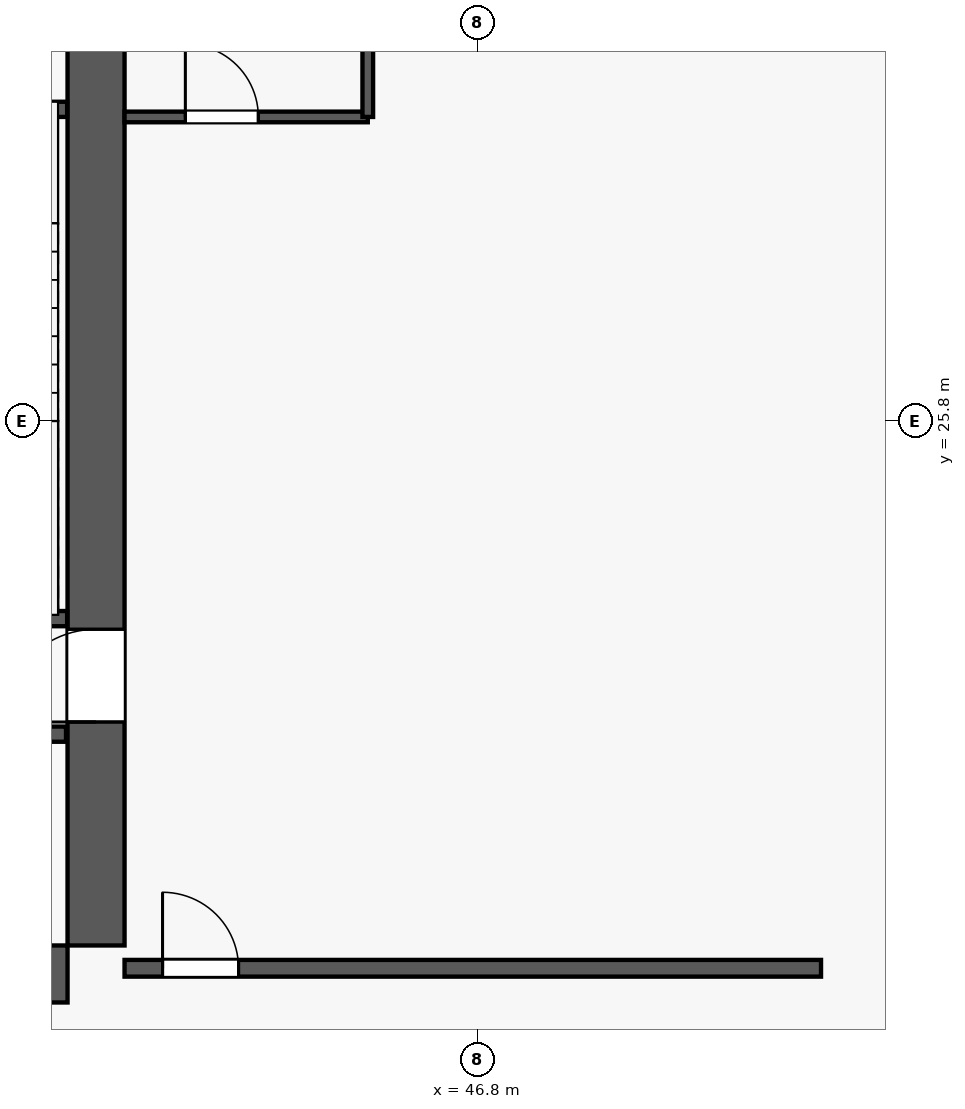
"""IFC4 building model, lengths in metres.
Left out: names, types, materials, properties, quantities, classifications, styles, units other than length and angle.
Written with IfcOpenShell. Run it as: python <this file> out.ifc"""

import sys

from ifc_helpers import new_model, si_unit, direction, frame, frame_2d, origin, origin_2d, place, context, subcontext, project, spatial, rectangle, extrude, element, fill, save


model = new_model("IFC4")
c1 = context("Model", 3, precision=1e-05, world=origin(), true_north=direction((0.0, 1.0)))
c2 = subcontext(c1, "Body", "Model", "MODEL_VIEW")
j1 = project(units=[si_unit("LENGTHUNIT", "METRE"), si_unit("PLANEANGLEUNIT", "RADIAN")], contexts=[c1])
p1 = place(None, origin())
s1 = spatial("IfcSite", under=j1, at=p1, CompositionType="ELEMENT")
p2 = place(p1, origin())
s2 = spatial("IfcBuilding", under=s1, at=p2, CompositionType="ELEMENT")
p3 = place(p2, frame((0.0, 0.0, 148.1)))
s3 = spatial("IfcBuildingStorey", under=s2, at=p3, CompositionType="ELEMENT", Elevation=148.1)
p4 = place(p3, frame((41.775, 18.525, 0.0), z_axis=(0.0, 0.0, 1.0), x_axis=(1.0, 0.0, 0.0)))
e1 = element("IfcColumn", 1, at=p4, inside=s3, PredefinedType="COLUMN", context=c2, shape_type="SweptSolid", body=[
    extrude(rectangle(XDim=0.75, YDim=0.75, at=origin_2d()), origin(), (0.0, 0.0, 1.0), 5.4),
])
p5 = place(p3, frame((23.4, 18.525, 0.0), z_axis=(0.0, 0.0, 1.0), x_axis=(1.0, 0.0, 0.0)))
e2 = element("IfcWall", 2, at=p5, inside=s3, PredefinedType="SHEAR", context=c2, shape_type="SweptSolid", body=[
    extrude(rectangle(XDim=18.0, YDim=0.75, at=frame_2d((9.0, 0.0))), origin(), (0.0, 0.0, 1.0), 5.19),
])
p6 = place(p3, frame((41.775, 18.9, 0.0), z_axis=(0.0, 0.0, 1.0), x_axis=(0.0, 1.0, 0.0)))
e3 = element("IfcWall", 3, at=p6, inside=s3, PredefinedType="SHEAR", context=c2, shape_type="SweptSolid", body=[
    extrude(rectangle(XDim=14.0, YDim=0.75, at=frame_2d((7.0, 0.0))), origin(), (0.0, 0.0, 1.0), 5.19),
])
p7 = place(p6, frame((2.94, 0.0, 0.0)))
e4 = element("IfcOpeningElement", 4, at=p7, cuts=e3, PredefinedType="OPENING", context=c2, shape_type="SweptSolid", body=[
    extrude(rectangle(XDim=1.22, YDim=2.25, at=frame_2d((0.61, 1.125))), frame((0.0, 0.385, 0.0), z_axis=(0.0, -1.0, 0.0), x_axis=(1.0, 0.0, 0.0)), (0.0, 0.0, 1.0), 0.77),
])
p8 = place(p3, frame((38.125, 23.2, 0.0), z_axis=(0.0, 0.0, 1.0), x_axis=(1.0, 0.0, 0.0)))
e5 = element("IfcWall", 5, at=p8, inside=s3, PredefinedType="PLUMBINGWALL", context=c2, shape_type="SweptSolid", body=[
    extrude(rectangle(XDim=3.27, YDim=0.2, at=frame_2d((1.635, 0.0))), origin(), (0.0, 0.0, 1.0), 5.19),
])
p9 = place(p3, frame((38.125, 29.9, 0.0), z_axis=(0.0, 0.0, 1.0), x_axis=(1.0, 0.0, 0.0)))
e6 = element("IfcWall", 6, at=p9, inside=s3, PredefinedType="PLUMBINGWALL", context=c2, shape_type="SweptSolid", body=[
    extrude(rectangle(XDim=3.27, YDim=0.2, at=frame_2d((1.635, 0.0))), origin(), (0.0, 0.0, 1.0), 5.19),
])
p10 = place(p9, frame((0.5, 0.0, 0.0)))
e7 = element("IfcOpeningElement", 7, at=p10, cuts=e6, PredefinedType="OPENING", context=c2, shape_type="SweptSolid", body=[
    extrude(rectangle(XDim=0.85, YDim=2.05, at=frame_2d((0.425, 1.025))), frame((0.0, 0.11, 0.0), z_axis=(0.0, -1.0, 0.0), x_axis=(1.0, 0.0, 0.0)), (0.0, 0.0, 1.0), 0.22),
])
p11 = place(p3, frame((23.42, 21.68, 0.0), z_axis=(0.0, 0.0, 1.0), x_axis=(1.0, 0.0, 0.0)))
e8 = element("IfcWall", 8, at=p11, inside=s3, PredefinedType="PLUMBINGWALL", context=c2, shape_type="SweptSolid", body=[
    extrude(rectangle(XDim=17.96, YDim=0.2, at=frame_2d((8.98, 0.0))), origin(), (0.0, 0.0, 1.0), 5.19),
])
p12 = place(p11, frame((11.6, 0.0, 0.0)))
e9 = element("IfcOpeningElement", 9, at=p12, cuts=e8, PredefinedType="OPENING", context=c2, shape_type="SweptSolid", body=[
    extrude(rectangle(XDim=1.1, YDim=2.2, at=frame_2d((0.55, 1.1))), frame((0.0, 0.11, 0.0), z_axis=(0.0, -1.0, 0.0), x_axis=(1.0, 0.0, 0.0)), (0.0, 0.0, 1.0), 0.22),
])
p13 = place(p11, frame((0.41, 0.0, 0.0)))
e10 = element("IfcOpeningElement", 10, at=p13, cuts=e8, PredefinedType="OPENING", context=c2, shape_type="SweptSolid", body=[
    extrude(rectangle(XDim=0.85, YDim=2.05, at=frame_2d((0.425, 1.025))), frame((0.0, 0.11, 0.0), z_axis=(0.0, -1.0, 0.0), x_axis=(1.0, 0.0, 0.0)), (0.0, 0.0, 1.0), 0.22),
])
p14 = place(p11, frame((6.03, 0.0, 0.0)))
e11 = element("IfcOpeningElement", 11, at=p14, cuts=e8, PredefinedType="OPENING", context=c2, shape_type="SweptSolid", body=[
    extrude(rectangle(XDim=0.85, YDim=2.05, at=frame_2d((0.425, 1.025))), frame((0.0, 0.11, 0.0), z_axis=(0.0, -1.0, 0.0), x_axis=(1.0, 0.0, 0.0)), (0.0, 0.0, 1.0), 0.22),
])
p15 = place(p11, frame((13.78, 0.0, 0.0)))
e12 = element("IfcOpeningElement", 12, at=p15, cuts=e8, PredefinedType="OPENING", context=c2, shape_type="SweptSolid", body=[
    extrude(rectangle(XDim=0.85, YDim=2.05, at=frame_2d((0.425, 1.025))), frame((0.0, 0.11, 0.0), z_axis=(0.0, -1.0, 0.0), x_axis=(1.0, 0.0, 0.0)), (0.0, 0.0, 1.0), 0.22),
])
p16 = place(p3, frame((42.15, 18.6, 0.0), z_axis=(0.0, 0.0, 1.0), x_axis=(1.0, 0.0, 0.0)))
e13 = element("IfcWall", 13, at=p16, inside=s3, PredefinedType="PARTITIONING", context=c2, shape_type="SweptSolid", body=[
    extrude(rectangle(XDim=9.163, YDim=0.22, at=frame_2d((4.582, 0.0))), origin(), (0.0, 0.0, 1.0), 4.572),
])
p17 = place(p16, frame((0.5, 0.0, 0.0)))
e14 = element("IfcOpeningElement", 14, at=p17, cuts=e13, PredefinedType="OPENING", context=c2, shape_type="SweptSolid", body=[
    extrude(rectangle(XDim=1.0, YDim=2.15, at=frame_2d((0.5, 1.075))), frame((0.0, 0.12, 0.0), z_axis=(0.0, -1.0, 0.0), x_axis=(1.0, 0.0, 0.0)), (0.0, 0.0, 1.0), 0.24),
])
p18 = place(p3, frame((42.15, 29.8, 0.0), z_axis=(0.0, 0.0, 1.0), x_axis=(1.0, 0.0, 0.0)))
e15 = element("IfcWall", 15, at=p18, inside=s3, PredefinedType="PLUMBINGWALL", context=c2, shape_type="SweptSolid", body=[
    extrude(rectangle(XDim=3.2, YDim=0.14, at=frame_2d((1.6, 0.0))), origin(), (0.0, 0.0, 1.0), 5.19),
])
p19 = place(p18, frame((0.8, 0.0, 0.0)))
e16 = element("IfcOpeningElement", 16, at=p19, cuts=e15, PredefinedType="OPENING", context=c2, shape_type="SweptSolid", body=[
    extrude(rectangle(XDim=0.96, YDim=2.15, at=frame_2d((0.48, 1.075))), frame((0.0, 0.08, 0.0), z_axis=(0.0, -1.0, 0.0), x_axis=(1.0, 0.0, 0.0)), (0.0, 0.0, 1.0), 0.16),
])
p20 = place(p3, frame((45.35, 29.8, 0.0), z_axis=(0.0, 0.0, 1.0), x_axis=(0.0, 1.0, 0.0)))
e17 = element("IfcWall", 17, at=p20, inside=s3, PredefinedType="PLUMBINGWALL", context=c2, shape_type="SweptSolid", body=[
    extrude(rectangle(XDim=3.4, YDim=0.14, at=frame_2d((1.7, 0.0))), origin(), (0.0, 0.0, 1.0), 4.825),
])
p21 = place(p7, origin())
e18 = element("IfcDoor", 18, at=p21, inside=s3, OperationType="SINGLE_SWING_LEFT", PredefinedType="DOOR", context=c2, shape_type="SweptSolid", body=[
    extrude(rectangle(XDim=1.22, YDim=2.25, at=frame_2d((0.61, 1.125))), frame((0.0, 0.025, 0.0), z_axis=(0.0, -1.0, 0.0), x_axis=(1.0, 0.0, 0.0)), (0.0, 0.0, 1.0), 0.05),
])
fill(e4, e18)
p22 = place(p19, origin())
e19 = element("IfcDoor", 19, at=p22, inside=s3, OperationType="SINGLE_SWING_LEFT", PredefinedType="DOOR", context=c2, shape_type="SweptSolid", body=[
    extrude(rectangle(XDim=0.96, YDim=2.15, at=frame_2d((0.48, 1.075))), frame((0.0, 0.025, 0.0), z_axis=(0.0, -1.0, 0.0), x_axis=(1.0, 0.0, 0.0)), (0.0, 0.0, 1.0), 0.05),
])
fill(e16, e19)
p23 = place(p17, origin())
e20 = element("IfcDoor", 20, at=p23, inside=s3, OperationType="SINGLE_SWING_LEFT", PredefinedType="DOOR", context=c2, shape_type="SweptSolid", body=[
    extrude(rectangle(XDim=1.0, YDim=2.15, at=frame_2d((0.5, 1.075))), frame((0.0, 0.025, 0.0), z_axis=(0.0, -1.0, 0.0), x_axis=(1.0, 0.0, 0.0)), (0.0, 0.0, 1.0), 0.05),
])
fill(e14, e20)
save(model, sys.argv[1])
